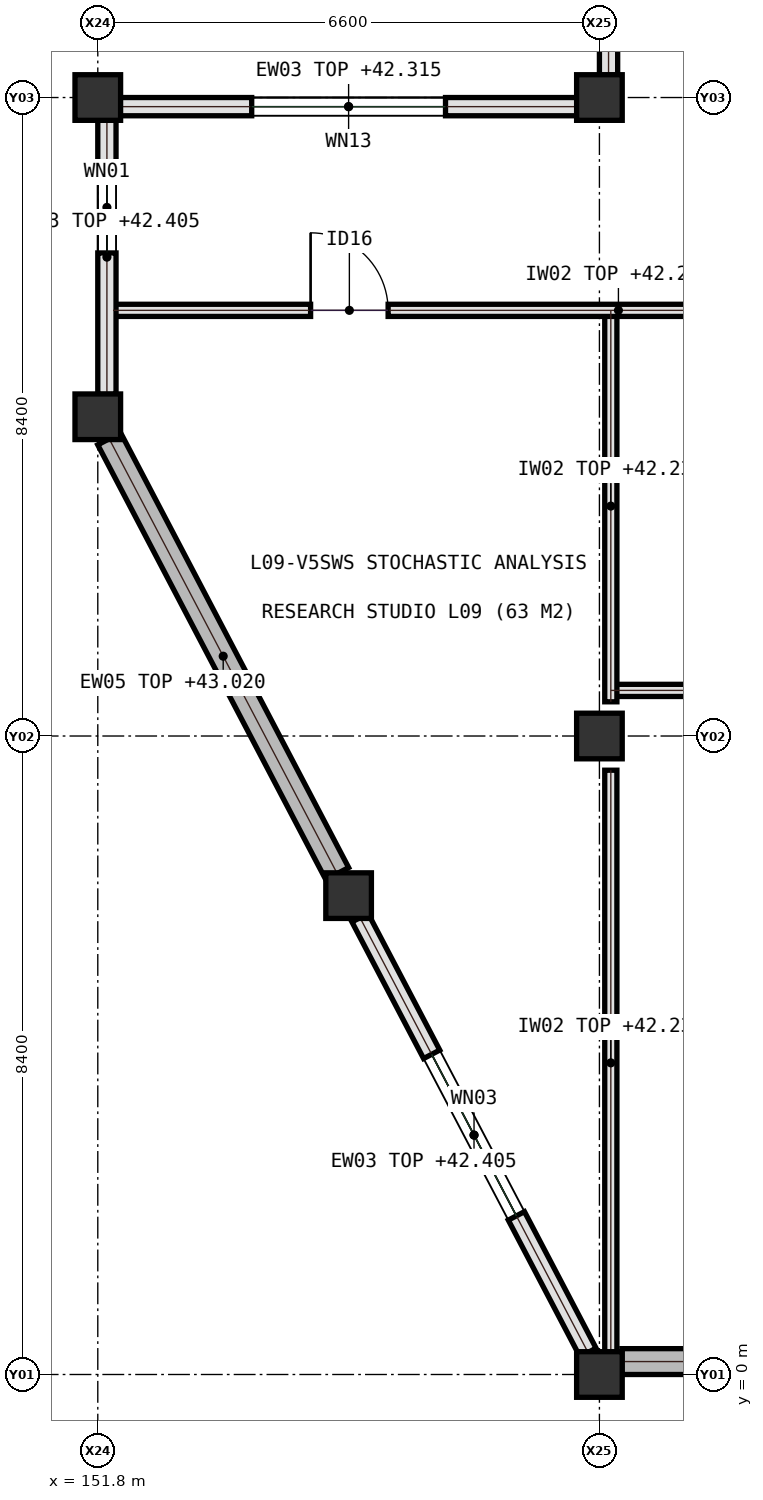
"""IFC4 building model, lengths in metres.
Left out: names, types, materials, properties, quantities, classifications, styles, units other than length and angle.
Written with IfcOpenShell. Run it as: python <this file> out.ifc"""

import sys

from ifc_helpers import new_model, si_unit, direction, frame, frame_2d, origin, origin_2d, place, context, subcontext, project, spatial, rectangle, extrude, element, fill, save


model = new_model("IFC4")
c1 = context("Model", 3, precision=1e-05, world=origin(), true_north=direction((0.0, 1.0)))
c2 = subcontext(c1, "Body", "Model", "MODEL_VIEW")
j1 = project(units=[si_unit("LENGTHUNIT", "METRE"), si_unit("PLANEANGLEUNIT", "RADIAN")], contexts=[c1])
p1 = place(None, origin())
s1 = spatial("IfcSite", under=j1, at=p1, CompositionType="ELEMENT")
p2 = place(p1, origin())
s2 = spatial("IfcBuilding", under=s1, at=p2, CompositionType="ELEMENT")
p3 = place(p2, frame((0.0, 0.0, 39.3)))
s3 = spatial("IfcBuildingStorey", under=s2, at=p3, CompositionType="ELEMENT", Elevation=39.3)
for number, where, z_axis, x_axis in (
    (1, (151.8, 16.8, 0.0), (0.0, 0.0, 1.0), (1.0, 0.0, 0.0)),
    (2, (158.4, 0.0, 0.0), (0.0, 0.0, 1.0), (1.0, 0.0, 0.0)),
    (3, (158.4, 8.4, 0.0), (0.0, 0.0, 1.0), (1.0, 0.0, 0.0)),
    (4, (158.4, 16.8, 0.0), (0.0, 0.0, 1.0), (1.0, 0.0, 0.0)),
):
    element("IfcColumn", number, at=place(p3, frame(where, z_axis=z_axis, x_axis=x_axis)), inside=s3, PredefinedType="COLUMN", context=c2, shape_type="SweptSolid", body=[
        extrude(rectangle(XDim=0.6, YDim=0.6, at=origin_2d()), origin(), (0.0, 0.0, 1.0), 3.9),
    ])
for number, where, z_axis, x_axis in (
    (5, (151.8, 12.6, 0.0), (0.0, 0.0, 1.0), (1.0, 0.0, 0.0)),
    (6, (155.1, 6.3, 0.0), (0.0, 0.0, 1.0), (1.0, 0.0, 0.0)),
):
    element("IfcColumn", number, at=place(p3, frame(where, z_axis=z_axis, x_axis=x_axis)), inside=s3, PredefinedType="COLUMN", context=c2, shape_type="SweptSolid", body=[
        extrude(rectangle(XDim=0.6, YDim=0.6, at=origin_2d()), origin(), (0.0, 0.0, 1.0), 3.72),
    ])
p4 = place(p3, frame((158.55, 9.0, 0.0), z_axis=(0.0, 0.0, 1.0), x_axis=(1.0, 0.0, 0.0)))
e7 = element("IfcWall", 7, at=p4, inside=s3, PredefinedType="PARTITIONING", context=c2, shape_type="SweptSolid", body=[
    extrude(rectangle(XDim=6.75, YDim=0.16, at=frame_2d((3.375, 0.0))), origin(), (0.0, 0.0, 1.0), 2.93),
])
p5 = place(p4, frame((2.5, 0.0, 0.0)))
e8 = element("IfcOpeningElement", 8, at=p5, cuts=e7, PredefinedType="OPENING", context=c2, shape_type="SweptSolid", body=[
    extrude(rectangle(XDim=1.05, YDim=2.15, at=frame_2d((0.525, 1.075))), frame((0.0, 0.09, 0.0), z_axis=(0.0, -1.0, 0.0), x_axis=(1.0, 0.0, 0.0)), (0.0, 0.0, 1.0), 0.18),
])
p6 = place(p3, frame((158.55, 0.25, 0.0), z_axis=(0.0, 0.0, 1.0), x_axis=(0.0, 1.0, 0.0)))
e9 = element("IfcWall", 9, at=p6, inside=s3, PredefinedType="PARTITIONING", context=c2, shape_type="SweptSolid", body=[
    extrude(rectangle(XDim=7.7, YDim=0.16, at=frame_2d((3.85, 0.0))), origin(), (0.0, 0.0, 1.0), 2.93),
])
p7 = place(p3, frame((158.55, 8.85, 0.0), z_axis=(0.0, 0.0, 1.0), x_axis=(0.0, 1.0, 0.0)))
e10 = element("IfcWall", 10, at=p7, inside=s3, PredefinedType="PARTITIONING", context=c2, shape_type="SweptSolid", body=[
    extrude(rectangle(XDim=5.15, YDim=0.16, at=frame_2d((2.575, 0.0))), origin(), (0.0, 0.0, 1.0), 2.93),
])
p8 = place(p3, frame((152.0, 14.0, 0.0), z_axis=(0.0, 0.0, 1.0), x_axis=(1.0, 0.0, 0.0)))
e11 = element("IfcWall", 11, at=p8, inside=s3, PredefinedType="PARTITIONING", context=c2, shape_type="SweptSolid", body=[
    extrude(rectangle(XDim=13.3, YDim=0.16, at=frame_2d((6.65, 0.0))), origin(), (0.0, 0.0, 1.0), 2.93),
])
p9 = place(p8, frame((2.6, 0.0, 0.0)))
e12 = element("IfcOpeningElement", 12, at=p9, cuts=e11, PredefinedType="OPENING", context=c2, shape_type="SweptSolid", body=[
    extrude(rectangle(XDim=1.02, YDim=2.18, at=frame_2d((0.51, 1.09))), frame((0.0, 0.09, 0.0), z_axis=(0.0, -1.0, 0.0), x_axis=(1.0, 0.0, 0.0)), (0.0, 0.0, 1.0), 0.18),
])
p10 = place(p8, frame((9.8, 0.0, 0.0)))
e13 = element("IfcOpeningElement", 13, at=p10, cuts=e11, PredefinedType="OPENING", context=c2, shape_type="SweptSolid", body=[
    extrude(rectangle(XDim=1.02, YDim=2.18, at=frame_2d((0.51, 1.09))), frame((0.0, 0.09, 0.0), z_axis=(0.0, -1.0, 0.0), x_axis=(1.0, 0.0, 0.0)), (0.0, 0.0, 1.0), 0.18),
])
p11 = place(p3, frame((158.105, 16.68, 0.0), z_axis=(0.0, 0.0, 1.0), x_axis=(-1.0, 0.0, 0.0)))
e14 = element("IfcWall", 14, at=p11, inside=s3, PredefinedType="SOLIDWALL", context=c2, shape_type="SweptSolid", body=[
    extrude(rectangle(XDim=6.01, YDim=0.24, at=frame_2d((3.005, 0.0))), origin(), (0.0, 0.0, 1.0), 3.015),
])
p12 = place(p11, frame((1.73, 0.0, 0.95)))
e15 = element("IfcOpeningElement", 15, at=p12, cuts=e14, PredefinedType="OPENING", context=c2, shape_type="SweptSolid", body=[
    extrude(rectangle(XDim=2.55, YDim=1.65, at=frame_2d((1.275, 0.825))), frame((0.0, 0.13, 0.0), z_axis=(0.0, -1.0, 0.0), x_axis=(1.0, 0.0, 0.0)), (0.0, 0.0, 1.0), 0.26),
])
p13 = place(p3, frame((158.695, 0.17, 0.0), z_axis=(0.0, 0.0, 1.0), x_axis=(1.0, 0.0, 0.0)))
e16 = element("IfcWall", 16, at=p13, inside=s3, PredefinedType="SHEAR", context=c2, shape_type="SweptSolid", body=[
    extrude(rectangle(XDim=6.01, YDim=0.34, at=frame_2d((3.005, 0.0))), origin(), (0.0, 0.0, 1.0), 3.68),
])
p14 = place(p3, frame((158.52, 24.905, 0.0), z_axis=(0.0, 0.0, 1.0), x_axis=(0.0, -1.0, 0.0)))
e17 = element("IfcWall", 17, at=p14, inside=s3, PredefinedType="SOLIDWALL", context=c2, shape_type="SweptSolid", body=[
    extrude(rectangle(XDim=7.81, YDim=0.24, at=frame_2d((3.905, 0.0))), origin(), (0.0, 0.0, 1.0), 2.965),
])
p15 = place(p3, frame((151.92, 16.505, 0.0), z_axis=(0.0, 0.0, 1.0), x_axis=(0.0, -1.0, 0.0)))
e18 = element("IfcWall", 18, at=p15, inside=s3, PredefinedType="SOLIDWALL", context=c2, shape_type="SweptSolid", body=[
    extrude(rectangle(XDim=3.61, YDim=0.24, at=frame_2d((1.805, 0.0))), origin(), (0.0, 0.0, 1.0), 3.105),
])
p16 = place(p15, frame((0.55, 0.0, 0.95)))
e19 = element("IfcOpeningElement", 19, at=p16, cuts=e18, PredefinedType="OPENING", context=c2, shape_type="SweptSolid", body=[
    extrude(rectangle(XDim=1.2, YDim=1.5, at=frame_2d((0.6, 0.75))), frame((0.0, 0.13, 0.0), z_axis=(0.0, -1.0, 0.0), x_axis=(1.0, 0.0, 0.0)), (0.0, 0.0, 1.0), 0.26),
])
p17 = place(p3, frame((151.95, 12.31, 0.0), z_axis=(0.0, 0.0, 1.0), x_axis=(0.464471613901, -0.885588007981, 0.0)))
e20 = element("IfcWall", 20, at=p17, inside=s3, PredefinedType="SHEAR", context=c2, shape_type="SweptSolid", body=[
    extrude(rectangle(XDim=6.459, YDim=0.34, at=frame_2d((3.229, 0.0))), origin(), (0.0, 0.0, 1.0), 3.72),
])
p18 = place(p3, frame((155.25, 6.01, 0.0), z_axis=(0.0, 0.0, 1.0), x_axis=(0.464471613901, -0.885588007981, 0.0)))
e21 = element("IfcWall", 21, at=p18, inside=s3, PredefinedType="SOLIDWALL", context=c2, shape_type="SweptSolid", body=[
    extrude(rectangle(XDim=6.459, YDim=0.24, at=frame_2d((3.229, 0.0))), origin(), (0.0, 0.0, 1.0), 3.105),
])
p19 = place(p18, frame((2.03, 0.0, 0.95)))
e22 = element("IfcOpeningElement", 22, at=p19, cuts=e21, PredefinedType="OPENING", context=c2, shape_type="SweptSolid", body=[
    extrude(rectangle(XDim=2.4, YDim=1.6, at=frame_2d((1.2, 0.8))), frame((0.0, 0.13, 0.0), z_axis=(0.0, -1.0, 0.0), x_axis=(1.0, 0.0, 0.0)), (0.0, 0.0, 1.0), 0.26),
])
p20 = place(p9, origin())
e23 = element("IfcDoor", 23, at=p20, inside=s3, OperationType="SINGLE_SWING_LEFT", PredefinedType="DOOR", context=c2, shape_type="SweptSolid", body=[
    extrude(rectangle(XDim=1.02, YDim=2.18, at=frame_2d((0.51, 1.09))), frame((0.0, 0.025, 0.0), z_axis=(0.0, -1.0, 0.0), x_axis=(1.0, 0.0, 0.0)), (0.0, 0.0, 1.0), 0.05),
])
fill(e12, e23)
p21 = place(p12, origin())
e24 = element("IfcWindow", 24, at=p21, inside=s3, PartitioningType="SINGLE_PANEL", PredefinedType="WINDOW", context=c2, shape_type="SweptSolid", body=[
    extrude(rectangle(XDim=2.55, YDim=1.65, at=frame_2d((1.275, 0.825))), frame((0.0, 0.03, 0.0), z_axis=(0.0, -1.0, 0.0), x_axis=(1.0, 0.0, 0.0)), (0.0, 0.0, 1.0), 0.06),
])
fill(e15, e24)
p22 = place(p16, origin())
e25 = element("IfcWindow", 25, at=p22, inside=s3, PartitioningType="SINGLE_PANEL", PredefinedType="WINDOW", context=c2, shape_type="SweptSolid", body=[
    extrude(rectangle(XDim=1.2, YDim=1.5, at=frame_2d((0.6, 0.75))), frame((0.0, 0.03, 0.0), z_axis=(0.0, -1.0, 0.0), x_axis=(1.0, 0.0, 0.0)), (0.0, 0.0, 1.0), 0.06),
])
fill(e19, e25)
p23 = place(p19, origin())
e26 = element("IfcWindow", 26, at=p23, inside=s3, PartitioningType="SINGLE_PANEL", PredefinedType="WINDOW", context=c2, shape_type="SweptSolid", body=[
    extrude(rectangle(XDim=2.4, YDim=1.6, at=frame_2d((1.2, 0.8))), frame((0.0, 0.03, 0.0), z_axis=(0.0, -1.0, 0.0), x_axis=(1.0, 0.0, 0.0)), (0.0, 0.0, 1.0), 0.06),
])
fill(e22, e26)
save(model, sys.argv[1])
